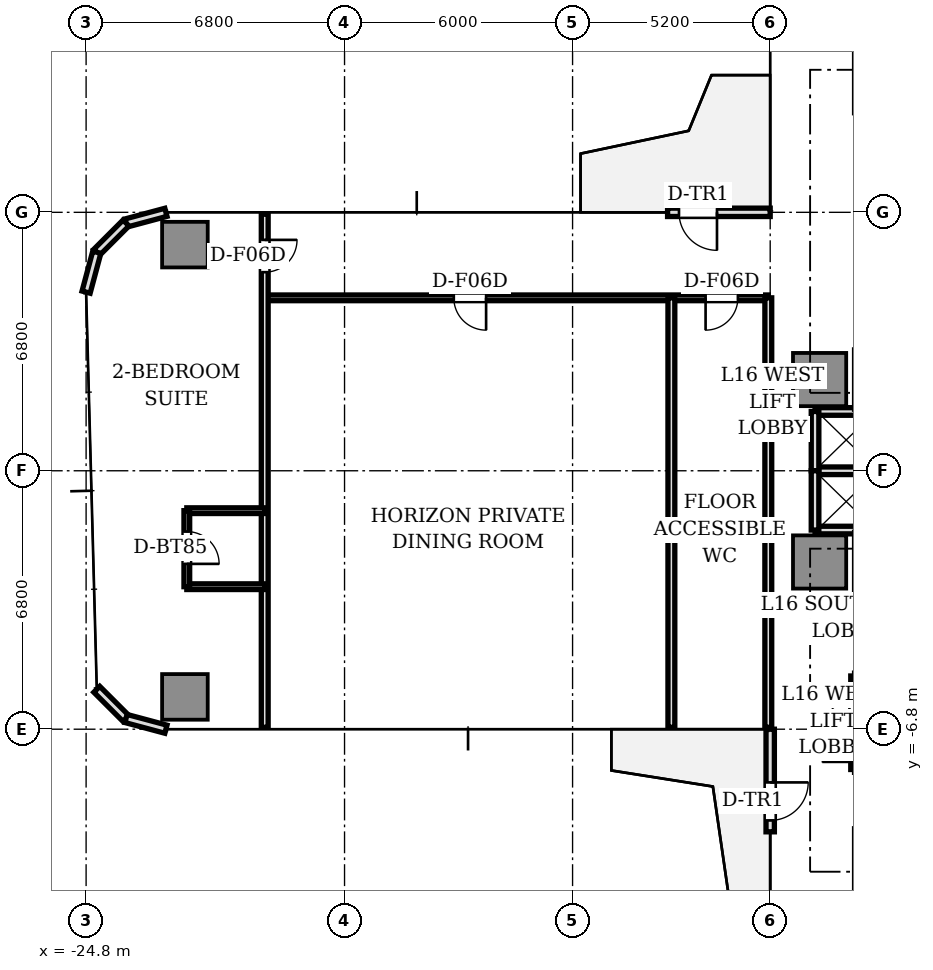
"""IFC4 building model, lengths in metres.
Left out: names, types, materials, properties, quantities, classifications, styles, units other than length and angle.
Written with IfcOpenShell. Run it as: python <this file> out.ifc"""

import sys

from ifc_helpers import new_model, si_unit, direction, frame, frame_2d, origin, origin_2d, place, context, subcontext, project, spatial, rectangle, extrude, source, transform, mapped, element, fill, save


model = new_model("IFC4")
c1 = context("Model", 3, precision=1e-05, world=origin(), true_north=direction((0.0, 1.0)))
c2 = subcontext(c1, "Body", "Model", "MODEL_VIEW")
j1 = project(units=[si_unit("LENGTHUNIT", "METRE"), si_unit("PLANEANGLEUNIT", "RADIAN")], contexts=[c1])
p1 = place(None, origin())
s1 = spatial("IfcSite", under=j1, at=p1, CompositionType="ELEMENT")
p2 = place(p1, origin())
s2 = spatial("IfcBuilding", under=s1, at=p2, CompositionType="ELEMENT")
p3 = place(p2, frame((0.0, 0.0, 61.1)))
s3 = spatial("IfcBuildingStorey", under=s2, at=p3, CompositionType="ELEMENT", Elevation=61.1)
m1 = source(origin(), c2, "Body", "SweptSolid", [
    extrude(rectangle(XDim=1.4, YDim=1.4, at=origin_2d()), origin(), (0.0, 0.0, 1.0), 3.11),
])
for number, where, z_axis, x_axis in (
    (1, (-5.5, 2.4, 0.0), (0.0, 0.0, 1.0), (1.0, 0.0, 0.0)),
    (2, (-5.5, -2.4, 0.0), (0.0, 0.0, 1.0), (1.0, 0.0, 0.0)),
):
    element("IfcColumn", number, at=place(p3, frame(where, z_axis=z_axis, x_axis=x_axis)), inside=s3, PredefinedType="COLUMN", context=c2, shape_type="MappedRepresentation", body=[
        mapped(m1, transform((0.0, 0.0, 0.0), scale=1.0)),
    ])
m2 = source(origin(), c2, "Body", "SweptSolid", [
    extrude(rectangle(XDim=1.2, YDim=1.2, at=origin_2d()), origin(), (0.0, 0.0, 1.0), 3.11),
])
for number, where, z_axis, x_axis in (
    (3, (-22.2, 5.95, 0.0), (0.0, 0.0, 1.0), (1.0, 0.0, 0.0)),
    (4, (-22.2, -5.95, 0.0), (0.0, 0.0, 1.0), (1.0, 0.0, 0.0)),
):
    element("IfcColumn", number, at=place(p3, frame(where, z_axis=z_axis, x_axis=x_axis)), inside=s3, PredefinedType="COLUMN", context=c2, shape_type="MappedRepresentation", body=[
        mapped(m2, transform((0.0, 0.0, 0.0), scale=1.0)),
    ])
p4 = place(p3, frame((-6.8, 6.8, 0.0), z_axis=(0.0, 0.0, 1.0), x_axis=(-1.0, 0.0, 0.0)))
e5 = element("IfcWall", 5, at=p4, inside=s3, PredefinedType="STANDARD", context=c2, shape_type="SweptSolid", body=[
    extrude(rectangle(XDim=2.7, YDim=0.22, at=frame_2d((1.35, 0.0))), origin(), (0.0, 0.0, 1.0), 3.11),
])
p5 = place(p4, frame((1.4, 0.0, 0.0)))
e6 = element("IfcOpeningElement", 6, at=p5, cuts=e5, PredefinedType="OPENING", context=c2, shape_type="SweptSolid", body=[
    extrude(rectangle(XDim=1.0, YDim=2.2, at=frame_2d((0.5, 1.1))), frame((0.0, 0.12, 0.0), z_axis=(0.0, -1.0, 0.0), x_axis=(1.0, 0.0, 0.0)), (0.0, 0.0, 1.0), 0.24),
])
for number, where, z_axis, x_axis in (
    (7, (-22.7, 6.8, 0.0), (0.0, 0.0, 1.0), (-0.966, -0.259, 0.0)),
    (8, (-23.75, 6.519, 0.0), (0.0, 0.0, 1.0), (-0.707, -0.707, 0.0)),
    (9, (-24.519, 5.75, 0.0), (0.0, 0.0, 1.0), (-0.259, -0.966, 0.0)),
    (10, (-24.519, -5.75, 0.0), (0.0, 0.0, 1.0), (0.707, -0.707, 0.0)),
    (11, (-23.75, -6.519, 0.0), (0.0, 0.0, 1.0), (0.966, -0.259, 0.0)),
):
    element("IfcWall", number, at=place(p3, frame(where, z_axis=z_axis, x_axis=x_axis)), inside=s3, PredefinedType="STANDARD", context=c2, shape_type="SweptSolid", body=[
        extrude(rectangle(XDim=1.087, YDim=0.22, at=frame_2d((0.543, 0.0))), origin(), (0.0, 0.0, 1.0), 3.11),
    ])
p6 = place(p3, frame((-6.8, -6.8, 0.0), z_axis=(0.0, 0.0, 1.0), x_axis=(0.0, -1.0, 0.0)))
e12 = element("IfcWall", 12, at=p6, inside=s3, PredefinedType="STANDARD", context=c2, shape_type="SweptSolid", body=[
    extrude(rectangle(XDim=2.7, YDim=0.22, at=frame_2d((1.35, 0.0))), origin(), (0.0, 0.0, 1.0), 3.11),
])
p7 = place(p6, frame((1.4, 0.0, 0.0)))
e13 = element("IfcOpeningElement", 13, at=p7, cuts=e12, PredefinedType="OPENING", context=c2, shape_type="SweptSolid", body=[
    extrude(rectangle(XDim=1.0, YDim=2.2, at=frame_2d((0.5, 1.1))), frame((0.0, 0.12, 0.0), z_axis=(0.0, -1.0, 0.0), x_axis=(1.0, 0.0, 0.0)), (0.0, 0.0, 1.0), 0.24),
])
for number, where, z_axis, x_axis in (
    (14, (-5.62, 1.56, 0.0), (0.0, 0.0, 1.0), (1.0, 0.0, 0.0)),
    (15, (-5.62, -1.56, 0.0), (0.0, 0.0, 1.0), (1.0, 0.0, 0.0)),
    (16, (-5.62, 0.0, 0.0), (0.0, 0.0, 1.0), (1.0, 0.0, 0.0)),
):
    element("IfcWall", number, at=place(p3, frame(where, z_axis=z_axis, x_axis=x_axis)), inside=s3, PredefinedType="SOLIDWALL", context=c2, shape_type="SweptSolid", body=[
        extrude(rectangle(XDim=1.64, YDim=0.2, at=frame_2d((0.82, 0.0))), origin(), (0.0, 0.0, 1.0), 2.66),
    ])
for number, where, z_axis, x_axis in (
    (17, (-5.62, 0.0, 0.0), (0.0, 0.0, 1.0), (0.0, 1.0, 0.0)),
    (18, (-5.62, -1.56, 0.0), (0.0, 0.0, 1.0), (0.0, 1.0, 0.0)),
):
    element("IfcWall", number, at=place(p3, frame(where, z_axis=z_axis, x_axis=x_axis)), inside=s3, PredefinedType="SOLIDWALL", context=c2, shape_type="SweptSolid", body=[
        extrude(rectangle(XDim=1.56, YDim=0.2, at=frame_2d((0.78, 0.0))), origin(), (0.0, 0.0, 1.0), 2.66),
    ])
p8 = place(p3, frame((-4.58, -7.86, 0.0), z_axis=(0.0, 0.0, 1.0), x_axis=(0.0, 1.0, 0.0)))
e19 = element("IfcWall", 19, at=p8, inside=s3, PredefinedType="SOLIDWALL", context=c2, shape_type="SweptSolid", body=[
    extrude(rectangle(XDim=2.46, YDim=0.2, at=frame_2d((1.23, 0.0))), origin(), (0.0, 0.0, 1.0), 2.66),
])
p9 = place(p8, frame((0.2, 0.0, 0.0)))
e20 = element("IfcOpeningElement", 20, at=p9, cuts=e19, PredefinedType="OPENING", context=c2, shape_type="SweptSolid", body=[
    extrude(rectangle(XDim=0.85, YDim=2.1, at=frame_2d((0.425, 1.05))), frame((0.0, 0.11, 0.0), z_axis=(0.0, -1.0, 0.0), x_axis=(1.0, 0.0, 0.0)), (0.0, 0.0, 1.0), 0.22),
])
p10 = place(p8, frame((1.38, 0.0, 0.0)))
e21 = element("IfcOpeningElement", 21, at=p10, cuts=e19, PredefinedType="OPENING", context=c2, shape_type="SweptSolid", body=[
    extrude(rectangle(XDim=0.85, YDim=2.1, at=frame_2d((0.425, 1.05))), frame((0.0, 0.11, 0.0), z_axis=(0.0, -1.0, 0.0), x_axis=(1.0, 0.0, 0.0)), (0.0, 0.0, 1.0), 0.22),
])
p11 = place(p3, frame((-6.85, 4.55, 0.0), z_axis=(0.0, 0.0, 1.0), x_axis=(-1.0, 0.0, 0.0)))
e22 = element("IfcWall", 22, at=p11, inside=s3, PredefinedType="PARTITIONING", context=c2, shape_type="SweptSolid", body=[
    extrude(rectangle(XDim=13.25, YDim=0.15, at=frame_2d((6.625, 0.0))), origin(), (0.0, 0.0, 1.0), 2.63),
])
p12 = place(p11, frame((0.8, 0.0, 0.0)))
e23 = element("IfcOpeningElement", 23, at=p12, cuts=e22, PredefinedType="OPENING", context=c2, shape_type="SweptSolid", body=[
    extrude(rectangle(XDim=0.85, YDim=2.1, at=frame_2d((0.425, 1.05))), frame((0.0, 0.085, 0.0), z_axis=(0.0, -1.0, 0.0), x_axis=(1.0, 0.0, 0.0)), (0.0, 0.0, 1.0), 0.17),
])
p13 = place(p11, frame((7.425, 0.0, 0.0)))
e24 = element("IfcOpeningElement", 24, at=p13, cuts=e22, PredefinedType="OPENING", context=c2, shape_type="SweptSolid", body=[
    extrude(rectangle(XDim=0.85, YDim=2.1, at=frame_2d((0.425, 1.05))), frame((0.0, 0.085, 0.0), z_axis=(0.0, -1.0, 0.0), x_axis=(1.0, 0.0, 0.0)), (0.0, 0.0, 1.0), 0.17),
])
for number, where, z_axis, x_axis in (
    (25, (-6.85, 4.55, 0.0), (0.0, 0.0, 1.0), (0.0, -1.0, 0.0)),
    (26, (-9.4, 4.55, 0.0), (0.0, 0.0, 1.0), (0.0, -1.0, 0.0)),
):
    element("IfcWall", number, at=place(p3, frame(where, z_axis=z_axis, x_axis=x_axis)), inside=s3, PredefinedType="PARTITIONING", context=c2, shape_type="SweptSolid", body=[
        extrude(rectangle(XDim=11.3, YDim=0.18, at=frame_2d((5.65, 0.0))), origin(), (0.0, 0.0, 1.0), 2.66),
    ])
p14 = place(p3, frame((-20.1, 6.75, 0.0), z_axis=(0.0, 0.0, 1.0), x_axis=(0.0, -1.0, 0.0)))
e27 = element("IfcWall", 27, at=p14, inside=s3, PredefinedType="PARTITIONING", context=c2, shape_type="SweptSolid", body=[
    extrude(rectangle(XDim=13.5, YDim=0.18, at=frame_2d((6.75, 0.0))), origin(), (0.0, 0.0, 1.0), 2.66),
])
p15 = place(p14, frame((0.675, 0.0, 0.0)))
e28 = element("IfcOpeningElement", 28, at=p15, cuts=e27, PredefinedType="OPENING", context=c2, shape_type="SweptSolid", body=[
    extrude(rectangle(XDim=0.85, YDim=2.1, at=frame_2d((0.425, 1.05))), frame((0.0, 0.1, 0.0), z_axis=(0.0, -1.0, 0.0), x_axis=(1.0, 0.0, 0.0)), (0.0, 0.0, 1.0), 0.2),
])
p16 = place(p3, frame((-20.1, -3.05, 0.0), z_axis=(0.0, 0.0, 1.0), x_axis=(-1.0, 0.0, 0.0)))
e29 = element("IfcWall", 29, at=p16, inside=s3, PredefinedType="PARTITIONING", context=c2, shape_type="SweptSolid", body=[
    extrude(rectangle(XDim=2.05, YDim=0.15, at=frame_2d((1.025, 0.0))), origin(), (0.0, 0.0, 1.0), 2.63),
])
p17 = place(p3, frame((-20.1, -1.05, 0.0), z_axis=(0.0, 0.0, 1.0), x_axis=(-1.0, 0.0, 0.0)))
e30 = element("IfcWall", 30, at=p17, inside=s3, PredefinedType="PARTITIONING", context=c2, shape_type="SweptSolid", body=[
    extrude(rectangle(XDim=2.05, YDim=0.15, at=frame_2d((1.025, 0.0))), origin(), (0.0, 0.0, 1.0), 2.66),
])
p18 = place(p3, frame((-22.15, -1.05, 0.0), z_axis=(0.0, 0.0, 1.0), x_axis=(0.0, -1.0, 0.0)))
e31 = element("IfcWall", 31, at=p18, inside=s3, PredefinedType="PARTITIONING", context=c2, shape_type="SweptSolid", body=[
    extrude(rectangle(XDim=2.0, YDim=0.15, at=frame_2d((1.0, 0.0))), origin(), (0.0, 0.0, 1.0), 2.58),
])
p19 = place(p18, frame((0.55, 0.0, 0.0)))
e32 = element("IfcOpeningElement", 32, at=p19, cuts=e31, PredefinedType="OPENING", context=c2, shape_type="SweptSolid", body=[
    extrude(rectangle(XDim=0.85, YDim=2.1, at=frame_2d((0.425, 1.05))), frame((0.0, 0.085, 0.0), z_axis=(0.0, -1.0, 0.0), x_axis=(1.0, 0.0, 0.0)), (0.0, 0.0, 1.0), 0.17),
])
m3 = source(origin(), c2, "Body", "SweptSolid", [
    extrude(rectangle(XDim=1.0, YDim=0.05, at=origin_2d()), origin(), (0.0, 0.0, 1.0), 2.2),
])
p20 = place(p5, frame((0.5, 0.0, 0.0)))
e33 = element("IfcDoor", 33, at=p20, inside=s3, OperationType="SINGLE_SWING_LEFT", PredefinedType="DOOR", context=c2, shape_type="MappedRepresentation", body=[
    mapped(m3, transform((0.0, 0.0, 0.0), scale=1.0)),
])
fill(e6, e33)
p21 = place(p7, frame((0.5, 0.0, 0.0)))
e34 = element("IfcDoor", 34, at=p21, inside=s3, OperationType="SINGLE_SWING_LEFT", PredefinedType="DOOR", context=c2, shape_type="MappedRepresentation", body=[
    mapped(m3, transform((0.0, 0.0, 0.0), scale=1.0)),
])
fill(e13, e34)
m4 = source(origin(), c2, "Body", "SweptSolid", [
    extrude(rectangle(XDim=0.85, YDim=0.05, at=origin_2d()), origin(), (0.0, 0.0, 1.0), 2.1),
])
p22 = place(p12, frame((0.425, 0.0, 0.0)))
e35 = element("IfcDoor", 35, at=p22, inside=s3, OperationType="SINGLE_SWING_RIGHT", PredefinedType="DOOR", context=c2, shape_type="MappedRepresentation", body=[
    mapped(m4, transform((0.0, 0.0, 0.0), scale=1.0)),
])
fill(e23, e35)
p23 = place(p13, frame((0.425, 0.0, 0.0)))
e36 = element("IfcDoor", 36, at=p23, inside=s3, OperationType="SINGLE_SWING_LEFT", PredefinedType="DOOR", context=c2, shape_type="MappedRepresentation", body=[
    mapped(m4, transform((0.0, 0.0, 0.0), scale=1.0)),
])
fill(e24, e36)
p24 = place(p19, frame((0.425, 0.0, 0.0)))
e37 = element("IfcDoor", 37, at=p24, inside=s3, OperationType="SINGLE_SWING_RIGHT", PredefinedType="DOOR", context=c2, shape_type="MappedRepresentation", body=[
    mapped(m4, transform((0.0, 0.0, 0.0), scale=1.0)),
])
fill(e32, e37)
p25 = place(p15, frame((0.425, 0.0, 0.0)))
e38 = element("IfcDoor", 38, at=p25, inside=s3, OperationType="SINGLE_SWING_LEFT", PredefinedType="DOOR", context=c2, shape_type="MappedRepresentation", body=[
    mapped(m4, transform((0.0, 0.0, 0.0), scale=1.0)),
])
fill(e28, e38)
save(model, sys.argv[1])
